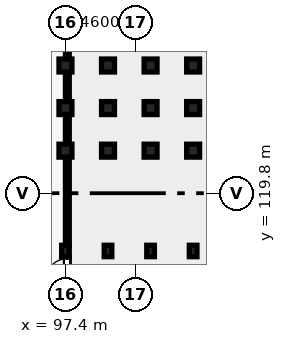
"""IFC4 building model, lengths in metres.
Left out: names, types, materials, properties, quantities, classifications, styles, units other than length and angle.
Written with IfcOpenShell. Run it as: python <this file> out.ifc"""

import sys

from ifc_helpers import new_model, si_unit, direction, frame, frame_2d, origin, origin_2d, place, context, subcontext, project, spatial, rectangle, extrude, element, fill, save


model = new_model("IFC4")
c1 = context("Model", 3, precision=1e-05, world=origin(), true_north=direction((0.0, 1.0)))
c2 = subcontext(c1, "Body", "Model", "MODEL_VIEW")
j1 = project(units=[si_unit("LENGTHUNIT", "METRE"), si_unit("PLANEANGLEUNIT", "RADIAN")], contexts=[c1])
p1 = place(None, origin())
s1 = spatial("IfcSite", under=j1, at=p1, CompositionType="ELEMENT")
p2 = place(p1, origin())
s2 = spatial("IfcBuilding", under=s1, at=p2, CompositionType="ELEMENT")
p3 = place(p2, origin())
s3 = spatial("IfcBuildingStorey", under=s2, at=p3, CompositionType="ELEMENT", Elevation=0.0)
p4 = place(p3, frame((105.8, 116.0, 0.0), z_axis=(0.0, 0.0, 1.0), x_axis=(1.0, 0.0, 0.0)))
e1 = element("IfcColumn", 1, at=p4, inside=s3, PredefinedType="COLUMN", context=c2, shape_type="SweptSolid", body=[
    extrude(rectangle(XDim=0.5, YDim=0.75, at=origin_2d()), origin(), (0.0, 0.0, 1.0), 4.15),
])
for number, where, z_axis, x_axis in (
    (2, (105.8, 122.6, 0.0), (0.0, 0.0, 1.0), (1.0, 0.0, 0.0)),
    (3, (105.8, 125.4, 0.0), (0.0, 0.0, 1.0), (1.0, 0.0, 0.0)),
    (4, (105.8, 128.2, 0.0), (0.0, 0.0, 1.0), (1.0, 0.0, 0.0)),
):
    element("IfcColumn", number, at=place(p3, frame(where, z_axis=z_axis, x_axis=x_axis)), inside=s3, PredefinedType="COLUMN", context=c2, shape_type="SweptSolid", body=[
        extrude(rectangle(XDim=0.85, YDim=0.85, at=origin_2d()), origin(), (0.0, 0.0, 1.0), 4.15),
    ])
p5 = place(p3, frame((103.0, 116.0, 0.0), z_axis=(0.0, 0.0, 1.0), x_axis=(1.0, 0.0, 0.0)))
e5 = element("IfcColumn", 5, at=p5, inside=s3, PredefinedType="COLUMN", context=c2, shape_type="SweptSolid", body=[
    extrude(rectangle(XDim=0.5, YDim=0.75, at=origin_2d()), origin(), (0.0, 0.0, 1.0), 4.15),
])
for number, where, z_axis, x_axis in (
    (6, (103.0, 122.6, 0.0), (0.0, 0.0, 1.0), (1.0, 0.0, 0.0)),
    (7, (103.0, 125.4, 0.0), (0.0, 0.0, 1.0), (1.0, 0.0, 0.0)),
    (8, (103.0, 128.2, 0.0), (0.0, 0.0, 1.0), (1.0, 0.0, 0.0)),
):
    element("IfcColumn", number, at=place(p3, frame(where, z_axis=z_axis, x_axis=x_axis)), inside=s3, PredefinedType="COLUMN", context=c2, shape_type="SweptSolid", body=[
        extrude(rectangle(XDim=0.85, YDim=0.85, at=origin_2d()), origin(), (0.0, 0.0, 1.0), 4.15),
    ])
p6 = place(p3, frame((100.2, 116.0, 0.0), z_axis=(0.0, 0.0, 1.0), x_axis=(1.0, 0.0, 0.0)))
e9 = element("IfcColumn", 9, at=p6, inside=s3, PredefinedType="COLUMN", context=c2, shape_type="SweptSolid", body=[
    extrude(rectangle(XDim=0.5, YDim=0.75, at=origin_2d()), origin(), (0.0, 0.0, 1.0), 4.15),
])
for number, where, z_axis, x_axis in (
    (10, (100.2, 122.6, 0.0), (0.0, 0.0, 1.0), (1.0, 0.0, 0.0)),
    (11, (100.2, 125.4, 0.0), (0.0, 0.0, 1.0), (1.0, 0.0, 0.0)),
    (12, (100.2, 128.2, 0.0), (0.0, 0.0, 1.0), (1.0, 0.0, 0.0)),
):
    element("IfcColumn", number, at=place(p3, frame(where, z_axis=z_axis, x_axis=x_axis)), inside=s3, PredefinedType="COLUMN", context=c2, shape_type="SweptSolid", body=[
        extrude(rectangle(XDim=0.85, YDim=0.85, at=origin_2d()), origin(), (0.0, 0.0, 1.0), 4.15),
    ])
p7 = place(p3, frame((97.4, 116.0, 0.0), z_axis=(0.0, 0.0, 1.0), x_axis=(1.0, 0.0, 0.0)))
e13 = element("IfcColumn", 13, at=p7, inside=s3, PredefinedType="COLUMN", context=c2, shape_type="SweptSolid", body=[
    extrude(rectangle(XDim=0.5, YDim=0.75, at=origin_2d()), origin(), (0.0, 0.0, 1.0), 4.15),
])
for number, where, z_axis, x_axis in (
    (14, (97.4, 122.6, 0.0), (0.0, 0.0, 1.0), (1.0, 0.0, 0.0)),
    (15, (97.4, 125.4, 0.0), (0.0, 0.0, 1.0), (1.0, 0.0, 0.0)),
    (16, (97.4, 128.2, 0.0), (0.0, 0.0, 1.0), (1.0, 0.0, 0.0)),
):
    element("IfcColumn", number, at=place(p3, frame(where, z_axis=z_axis, x_axis=x_axis)), inside=s3, PredefinedType="COLUMN", context=c2, shape_type="SweptSolid", body=[
        extrude(rectangle(XDim=0.85, YDim=0.85, at=origin_2d()), origin(), (0.0, 0.0, 1.0), 4.15),
    ])
p8 = place(p3, frame((108.6, 116.0, 0.0), z_axis=(0.0, 0.0, 1.0), x_axis=(-1.0, 0.0, 0.0)))
e17 = element("IfcWall", 17, at=p8, inside=s3, PredefinedType="STANDARD", context=c2, shape_type="SweptSolid", body=[
    extrude(rectangle(XDim=2.8, YDim=0.2, at=frame_2d((1.4, 0.0))), origin(), (0.0, 0.0, 1.0), 3.492),
])
p9 = place(p8, frame((0.9, 0.0, 0.0)))
e18 = element("IfcOpeningElement", 18, at=p9, cuts=e17, PredefinedType="OPENING", context=c2, shape_type="SweptSolid", body=[
    extrude(rectangle(XDim=1.0, YDim=2.15, at=frame_2d((0.5, 1.075))), frame((0.0, 0.11, 0.0), z_axis=(0.0, -1.0, 0.0), x_axis=(1.0, 0.0, 0.0)), (0.0, 0.0, 1.0), 0.22),
])
p10 = place(p3, frame((108.52, 128.2, 0.0), z_axis=(0.0, 0.0, 1.0), x_axis=(-1.0, 0.0, 0.0)))
e19 = element("IfcWall", 19, at=p10, inside=s3, PredefinedType="PLUMBINGWALL", context=c2, shape_type="SweptSolid", body=[
    extrude(rectangle(XDim=2.64, YDim=0.16, at=frame_2d((1.32, 0.0))), origin(), (0.0, 0.0, 1.0), 3.492),
])
p11 = place(p10, frame((0.87, 0.0, 0.0)))
e20 = element("IfcOpeningElement", 20, at=p11, cuts=e19, PredefinedType="OPENING", context=c2, shape_type="SweptSolid", body=[
    extrude(rectangle(XDim=0.9, YDim=2.1, at=frame_2d((0.45, 1.05))), frame((0.0, 0.09, 0.0), z_axis=(0.0, -1.0, 0.0), x_axis=(1.0, 0.0, 0.0)), (0.0, 0.0, 1.0), 0.18),
])
p12 = place(p3, frame((105.8, 116.0, 0.0), z_axis=(0.0, 0.0, 1.0), x_axis=(-1.0, 0.0, 0.0)))
e21 = element("IfcWall", 21, at=p12, inside=s3, PredefinedType="STANDARD", context=c2, shape_type="SweptSolid", body=[
    extrude(rectangle(XDim=2.8, YDim=0.2, at=frame_2d((1.4, 0.0))), origin(), (0.0, 0.0, 1.0), 3.492),
])
p13 = place(p3, frame((105.72, 128.2, 0.0), z_axis=(0.0, 0.0, 1.0), x_axis=(-1.0, 0.0, 0.0)))
e22 = element("IfcWall", 22, at=p13, inside=s3, PredefinedType="PLUMBINGWALL", context=c2, shape_type="SweptSolid", body=[
    extrude(rectangle(XDim=2.64, YDim=0.16, at=frame_2d((1.32, 0.0))), origin(), (0.0, 0.0, 1.0), 3.492),
])
p14 = place(p13, frame((0.92, 0.0, 0.0)))
e23 = element("IfcOpeningElement", 23, at=p14, cuts=e22, PredefinedType="OPENING", context=c2, shape_type="SweptSolid", body=[
    extrude(rectangle(XDim=0.8, YDim=2.1, at=frame_2d((0.4, 1.05))), frame((0.0, 0.09, 0.0), z_axis=(0.0, -1.0, 0.0), x_axis=(1.0, 0.0, 0.0)), (0.0, 0.0, 1.0), 0.18),
])
p15 = place(p3, frame((103.0, 116.0, 0.0), z_axis=(0.0, 0.0, 1.0), x_axis=(-1.0, 0.0, 0.0)))
e24 = element("IfcWall", 24, at=p15, inside=s3, PredefinedType="STANDARD", context=c2, shape_type="SweptSolid", body=[
    extrude(rectangle(XDim=2.8, YDim=0.2, at=frame_2d((1.4, 0.0))), origin(), (0.0, 0.0, 1.0), 3.492),
])
p16 = place(p15, frame((0.9, 0.0, 0.0)))
e25 = element("IfcOpeningElement", 25, at=p16, cuts=e24, PredefinedType="OPENING", context=c2, shape_type="SweptSolid", body=[
    extrude(rectangle(XDim=1.0, YDim=2.15, at=frame_2d((0.5, 1.075))), frame((0.0, 0.11, 0.0), z_axis=(0.0, -1.0, 0.0), x_axis=(1.0, 0.0, 0.0)), (0.0, 0.0, 1.0), 0.22),
])
p17 = place(p3, frame((102.92, 128.2, 0.0), z_axis=(0.0, 0.0, 1.0), x_axis=(-1.0, 0.0, 0.0)))
e26 = element("IfcWall", 26, at=p17, inside=s3, PredefinedType="PLUMBINGWALL", context=c2, shape_type="SweptSolid", body=[
    extrude(rectangle(XDim=2.64, YDim=0.16, at=frame_2d((1.32, 0.0))), origin(), (0.0, 0.0, 1.0), 3.492),
])
p18 = place(p17, frame((0.87, 0.0, 0.0)))
e27 = element("IfcOpeningElement", 27, at=p18, cuts=e26, PredefinedType="OPENING", context=c2, shape_type="SweptSolid", body=[
    extrude(rectangle(XDim=0.9, YDim=2.1, at=frame_2d((0.45, 1.05))), frame((0.0, 0.09, 0.0), z_axis=(0.0, -1.0, 0.0), x_axis=(1.0, 0.0, 0.0)), (0.0, 0.0, 1.0), 0.18),
])
p19 = place(p3, frame((100.2, 116.0, 0.0), z_axis=(0.0, 0.0, 1.0), x_axis=(-1.0, 0.0, 0.0)))
e28 = element("IfcWall", 28, at=p19, inside=s3, PredefinedType="STANDARD", context=c2, shape_type="SweptSolid", body=[
    extrude(rectangle(XDim=2.8, YDim=0.2, at=frame_2d((1.4, 0.0))), origin(), (0.0, 0.0, 1.0), 3.492),
])
p20 = place(p3, frame((100.12, 128.2, 0.0), z_axis=(0.0, 0.0, 1.0), x_axis=(-1.0, 0.0, 0.0)))
e29 = element("IfcWall", 29, at=p20, inside=s3, PredefinedType="PLUMBINGWALL", context=c2, shape_type="SweptSolid", body=[
    extrude(rectangle(XDim=2.64, YDim=0.16, at=frame_2d((1.32, 0.0))), origin(), (0.0, 0.0, 1.0), 3.492),
])
p21 = place(p20, frame((0.92, 0.0, 0.0)))
e30 = element("IfcOpeningElement", 30, at=p21, cuts=e29, PredefinedType="OPENING", context=c2, shape_type="SweptSolid", body=[
    extrude(rectangle(XDim=0.8, YDim=2.1, at=frame_2d((0.4, 1.05))), frame((0.0, 0.09, 0.0), z_axis=(0.0, -1.0, 0.0), x_axis=(1.0, 0.0, 0.0)), (0.0, 0.0, 1.0), 0.18),
])
p22 = place(p3, frame((105.8, 116.05, 0.0), z_axis=(0.0, 0.0, 1.0), x_axis=(0.0, 1.0, 0.0)))
e31 = element("IfcWall", 31, at=p22, inside=s3, PredefinedType="PARTITIONING", context=c2, shape_type="SweptSolid", body=[
    extrude(rectangle(XDim=6.53, YDim=0.15, at=frame_2d((3.265, 0.0))), origin(), (0.0, 0.0, 1.0), 3.492),
])
p23 = place(p22, frame((2.815, 0.0, 0.0)))
e32 = element("IfcOpeningElement", 32, at=p23, cuts=e31, PredefinedType="OPENING", context=c2, shape_type="SweptSolid", body=[
    extrude(rectangle(XDim=0.9, YDim=2.1, at=frame_2d((0.45, 1.05))), frame((0.0, 0.085, 0.0), z_axis=(0.0, -1.0, 0.0), x_axis=(1.0, 0.0, 0.0)), (0.0, 0.0, 1.0), 0.17),
])
p24 = place(p3, frame((105.8, 122.7, 0.0), z_axis=(0.0, 0.0, 1.0), x_axis=(0.0, 1.0, 0.0)))
e33 = element("IfcWall", 33, at=p24, inside=s3, PredefinedType="PARTITIONING", context=c2, shape_type="SweptSolid", body=[
    extrude(rectangle(XDim=10.82, YDim=0.15, at=frame_2d((5.41, 0.0))), origin(), (0.0, 0.0, 1.0), 3.492),
])
p25 = place(p24, frame((0.899, 0.0, 0.0)))
e34 = element("IfcOpeningElement", 34, at=p25, cuts=e33, PredefinedType="OPENING", context=c2, shape_type="SweptSolid", body=[
    extrude(rectangle(XDim=0.8, YDim=2.1, at=frame_2d((0.4, 1.05))), frame((0.0, 0.085, 0.0), z_axis=(0.0, -1.0, 0.0), x_axis=(1.0, 0.0, 0.0)), (0.0, 0.0, 1.0), 0.17),
])
p26 = place(p3, frame((103.0, 116.05, 0.0), z_axis=(0.0, 0.0, 1.0), x_axis=(0.0, 1.0, 0.0)))
e35 = element("IfcWall", 35, at=p26, inside=s3, PredefinedType="STANDARD", context=c2, shape_type="SweptSolid", body=[
    extrude(rectangle(XDim=6.53, YDim=0.22, at=frame_2d((3.265, 0.0))), origin(), (0.0, 0.0, 1.0), 3.492),
])
p27 = place(p3, frame((103.0, 122.7, 0.0), z_axis=(0.0, 0.0, 1.0), x_axis=(0.0, 1.0, 0.0)))
e36 = element("IfcWall", 36, at=p27, inside=s3, PredefinedType="STANDARD", context=c2, shape_type="SweptSolid", body=[
    extrude(rectangle(XDim=10.82, YDim=0.22, at=frame_2d((5.41, 0.0))), origin(), (0.0, 0.0, 1.0), 3.492),
])
p28 = place(p3, frame((100.2, 116.05, 0.0), z_axis=(0.0, 0.0, 1.0), x_axis=(0.0, 1.0, 0.0)))
e37 = element("IfcWall", 37, at=p28, inside=s3, PredefinedType="PARTITIONING", context=c2, shape_type="SweptSolid", body=[
    extrude(rectangle(XDim=6.53, YDim=0.15, at=frame_2d((3.265, 0.0))), origin(), (0.0, 0.0, 1.0), 3.492),
])
p29 = place(p28, frame((2.815, 0.0, 0.0)))
e38 = element("IfcOpeningElement", 38, at=p29, cuts=e37, PredefinedType="OPENING", context=c2, shape_type="SweptSolid", body=[
    extrude(rectangle(XDim=0.9, YDim=2.1, at=frame_2d((0.45, 1.05))), frame((0.0, 0.085, 0.0), z_axis=(0.0, -1.0, 0.0), x_axis=(1.0, 0.0, 0.0)), (0.0, 0.0, 1.0), 0.17),
])
p30 = place(p3, frame((100.2, 122.7, 0.0), z_axis=(0.0, 0.0, 1.0), x_axis=(0.0, 1.0, 0.0)))
e39 = element("IfcWall", 39, at=p30, inside=s3, PredefinedType="PARTITIONING", context=c2, shape_type="SweptSolid", body=[
    extrude(rectangle(XDim=10.82, YDim=0.15, at=frame_2d((5.41, 0.0))), origin(), (0.0, 0.0, 1.0), 3.492),
])
p31 = place(p30, frame((0.899, 0.0, 0.0)))
e40 = element("IfcOpeningElement", 40, at=p31, cuts=e39, PredefinedType="OPENING", context=c2, shape_type="SweptSolid", body=[
    extrude(rectangle(XDim=0.8, YDim=2.1, at=frame_2d((0.4, 1.05))), frame((0.0, 0.085, 0.0), z_axis=(0.0, -1.0, 0.0), x_axis=(1.0, 0.0, 0.0)), (0.0, 0.0, 1.0), 0.17),
])
p32 = place(p3, frame((97.525, 113.979, 0.0), z_axis=(0.0, 0.0, 1.0), x_axis=(0.0, 1.0, 0.0)))
e41 = element("IfcWall", 41, at=p32, inside=s3, PredefinedType="STANDARD", context=c2, shape_type="SweptSolid", body=[
    extrude(rectangle(XDim=1.643, YDim=0.25, at=frame_2d((0.822, 0.0))), origin(), (0.0, 0.0, 1.0), 3.492),
])
p33 = place(p32, frame((0.123, 0.0, 0.0)))
e42 = element("IfcOpeningElement", 42, at=p33, cuts=e41, PredefinedType="OPENING", context=c2, shape_type="SweptSolid", body=[
    extrude(rectangle(XDim=1.4, YDim=2.15, at=frame_2d((0.7, 1.075))), frame((0.0, 0.135, 0.0), z_axis=(0.0, -1.0, 0.0), x_axis=(1.0, 0.0, 0.0)), (0.0, 0.0, 1.0), 0.27),
])
p34 = place(p3, frame((97.525, 116.378, 0.0), z_axis=(0.0, 0.0, 1.0), x_axis=(0.0, 1.0, 0.0)))
e43 = element("IfcWall", 43, at=p34, inside=s3, PredefinedType="STANDARD", context=c2, shape_type="SweptSolid", body=[
    extrude(rectangle(XDim=5.802, YDim=0.25, at=frame_2d((2.901, 0.0))), origin(), (0.0, 0.0, 1.0), 3.492),
])
p35 = place(p34, frame((2.171, 0.0, 0.88)))
e44 = element("IfcOpeningElement", 44, at=p35, cuts=e43, PredefinedType="OPENING", context=c2, shape_type="SweptSolid", body=[
    extrude(rectangle(XDim=1.5, YDim=1.65, at=frame_2d((0.75, 0.825))), frame((0.0, 0.135, 0.0), z_axis=(0.0, -1.0, 0.0), x_axis=(1.0, 0.0, 0.0)), (0.0, 0.0, 1.0), 0.27),
])
p36 = place(p3, frame((97.525, 123.02, 0.0), z_axis=(0.0, 0.0, 1.0), x_axis=(0.0, 1.0, 0.0)))
e45 = element("IfcWall", 45, at=p36, inside=s3, PredefinedType="STANDARD", context=c2, shape_type="SweptSolid", body=[
    extrude(rectangle(XDim=1.96, YDim=0.25, at=frame_2d((0.98, 0.0))), origin(), (0.0, 0.0, 1.0), 3.492),
])
p37 = place(p36, frame((0.38, 0.0, 0.88)))
e46 = element("IfcOpeningElement", 46, at=p37, cuts=e45, PredefinedType="OPENING", context=c2, shape_type="SweptSolid", body=[
    extrude(rectangle(XDim=1.2, YDim=1.5, at=frame_2d((0.6, 0.75))), frame((0.0, 0.135, 0.0), z_axis=(0.0, -1.0, 0.0), x_axis=(1.0, 0.0, 0.0)), (0.0, 0.0, 1.0), 0.27),
])
p38 = place(p3, frame((97.525, 125.82, 0.0), z_axis=(0.0, 0.0, 1.0), x_axis=(0.0, 1.0, 0.0)))
e47 = element("IfcWall", 47, at=p38, inside=s3, PredefinedType="STANDARD", context=c2, shape_type="SweptSolid", body=[
    extrude(rectangle(XDim=1.96, YDim=0.25, at=frame_2d((0.98, 0.0))), origin(), (0.0, 0.0, 1.0), 3.492),
])
p39 = place(p38, frame((0.38, 0.0, 0.88)))
e48 = element("IfcOpeningElement", 48, at=p39, cuts=e47, PredefinedType="OPENING", context=c2, shape_type="SweptSolid", body=[
    extrude(rectangle(XDim=1.2, YDim=1.5, at=frame_2d((0.6, 0.75))), frame((0.0, 0.135, 0.0), z_axis=(0.0, -1.0, 0.0), x_axis=(1.0, 0.0, 0.0)), (0.0, 0.0, 1.0), 0.27),
])
p40 = place(p3, frame((97.525, 128.62, 0.0), z_axis=(0.0, 0.0, 1.0), x_axis=(0.0, 1.0, 0.0)))
e49 = element("IfcWall", 49, at=p40, inside=s3, PredefinedType="STANDARD", context=c2, shape_type="SweptSolid", body=[
    extrude(rectangle(XDim=1.96, YDim=0.25, at=frame_2d((0.98, 0.0))), origin(), (0.0, 0.0, 1.0), 3.492),
])
p41 = place(p40, frame((0.38, 0.0, 0.88)))
e50 = element("IfcOpeningElement", 50, at=p41, cuts=e49, PredefinedType="OPENING", context=c2, shape_type="SweptSolid", body=[
    extrude(rectangle(XDim=1.2, YDim=1.5, at=frame_2d((0.6, 0.75))), frame((0.0, 0.135, 0.0), z_axis=(0.0, -1.0, 0.0), x_axis=(1.0, 0.0, 0.0)), (0.0, 0.0, 1.0), 0.27),
])
p42 = place(p35, origin())
e51 = element("IfcWindow", 51, at=p42, inside=s3, PartitioningType="DOUBLE_PANEL_VERTICAL", PredefinedType="WINDOW", context=c2, shape_type="SweptSolid", body=[
    extrude(rectangle(XDim=1.5, YDim=1.65, at=frame_2d((0.75, 0.825))), frame((0.0, 0.03, 0.0), z_axis=(0.0, -1.0, 0.0), x_axis=(1.0, 0.0, 0.0)), (0.0, 0.0, 1.0), 0.06),
])
fill(e44, e51)
p43 = place(p37, origin())
e52 = element("IfcWindow", 52, at=p43, inside=s3, PartitioningType="SINGLE_PANEL", PredefinedType="WINDOW", context=c2, shape_type="SweptSolid", body=[
    extrude(rectangle(XDim=1.2, YDim=1.5, at=frame_2d((0.6, 0.75))), frame((0.0, 0.03, 0.0), z_axis=(0.0, -1.0, 0.0), x_axis=(1.0, 0.0, 0.0)), (0.0, 0.0, 1.0), 0.06),
])
fill(e46, e52)
p44 = place(p39, origin())
e53 = element("IfcWindow", 53, at=p44, inside=s3, PartitioningType="SINGLE_PANEL", PredefinedType="WINDOW", context=c2, shape_type="SweptSolid", body=[
    extrude(rectangle(XDim=1.2, YDim=1.5, at=frame_2d((0.6, 0.75))), frame((0.0, 0.03, 0.0), z_axis=(0.0, -1.0, 0.0), x_axis=(1.0, 0.0, 0.0)), (0.0, 0.0, 1.0), 0.06),
])
fill(e48, e53)
p45 = place(p41, origin())
e54 = element("IfcWindow", 54, at=p45, inside=s3, PartitioningType="SINGLE_PANEL", PredefinedType="WINDOW", context=c2, shape_type="SweptSolid", body=[
    extrude(rectangle(XDim=1.2, YDim=1.5, at=frame_2d((0.6, 0.75))), frame((0.0, 0.03, 0.0), z_axis=(0.0, -1.0, 0.0), x_axis=(1.0, 0.0, 0.0)), (0.0, 0.0, 1.0), 0.06),
])
fill(e50, e54)
p46 = place(p14, origin())
e55 = element("IfcDoor", 55, at=p46, inside=s3, OperationType="SINGLE_SWING_LEFT", PredefinedType="DOOR", context=c2, shape_type="SweptSolid", body=[
    extrude(rectangle(XDim=0.8, YDim=2.1, at=frame_2d((0.4, 1.05))), frame((0.0, 0.025, 0.0), z_axis=(0.0, -1.0, 0.0), x_axis=(1.0, 0.0, 0.0)), (0.0, 0.0, 1.0), 0.05),
])
fill(e23, e55)
p47 = place(p18, origin())
e56 = element("IfcDoor", 56, at=p47, inside=s3, OperationType="SINGLE_SWING_LEFT", PredefinedType="DOOR", context=c2, shape_type="SweptSolid", body=[
    extrude(rectangle(XDim=0.9, YDim=2.1, at=frame_2d((0.45, 1.05))), frame((0.0, 0.025, 0.0), z_axis=(0.0, -1.0, 0.0), x_axis=(1.0, 0.0, 0.0)), (0.0, 0.0, 1.0), 0.05),
])
fill(e27, e56)
p48 = place(p16, frame((1.0, 0.0, 0.0), z_axis=(0.0, 0.0, 1.0), x_axis=(-1.0, 0.0, 0.0)))
e57 = element("IfcDoor", 57, at=p48, inside=s3, OperationType="SINGLE_SWING_RIGHT", PredefinedType="DOOR", context=c2, shape_type="SweptSolid", body=[
    extrude(rectangle(XDim=1.0, YDim=2.15, at=frame_2d((0.5, 1.075))), frame((0.0, 0.025, 0.0), z_axis=(0.0, -1.0, 0.0), x_axis=(1.0, 0.0, 0.0)), (0.0, 0.0, 1.0), 0.05),
])
fill(e25, e57)
p49 = place(p21, origin())
e58 = element("IfcDoor", 58, at=p49, inside=s3, OperationType="SINGLE_SWING_LEFT", PredefinedType="DOOR", context=c2, shape_type="SweptSolid", body=[
    extrude(rectangle(XDim=0.8, YDim=2.1, at=frame_2d((0.4, 1.05))), frame((0.0, 0.025, 0.0), z_axis=(0.0, -1.0, 0.0), x_axis=(1.0, 0.0, 0.0)), (0.0, 0.0, 1.0), 0.05),
])
fill(e30, e58)
p50 = place(p23, frame((0.9, 0.0, 0.0), z_axis=(0.0, 0.0, 1.0), x_axis=(-1.0, 0.0, 0.0)))
e59 = element("IfcDoor", 59, at=p50, inside=s3, OperationType="SINGLE_SWING_RIGHT", PredefinedType="DOOR", context=c2, shape_type="SweptSolid", body=[
    extrude(rectangle(XDim=0.9, YDim=2.1, at=frame_2d((0.45, 1.05))), frame((0.0, 0.025, 0.0), z_axis=(0.0, -1.0, 0.0), x_axis=(1.0, 0.0, 0.0)), (0.0, 0.0, 1.0), 0.05),
])
fill(e32, e59)
p51 = place(p25, origin())
e60 = element("IfcDoor", 60, at=p51, inside=s3, OperationType="SINGLE_SWING_LEFT", PredefinedType="DOOR", context=c2, shape_type="SweptSolid", body=[
    extrude(rectangle(XDim=0.8, YDim=2.1, at=frame_2d((0.4, 1.05))), frame((0.0, 0.025, 0.0), z_axis=(0.0, -1.0, 0.0), x_axis=(1.0, 0.0, 0.0)), (0.0, 0.0, 1.0), 0.05),
])
fill(e34, e60)
p52 = place(p29, origin())
e61 = element("IfcDoor", 61, at=p52, inside=s3, OperationType="SINGLE_SWING_LEFT", PredefinedType="DOOR", context=c2, shape_type="SweptSolid", body=[
    extrude(rectangle(XDim=0.9, YDim=2.1, at=frame_2d((0.45, 1.05))), frame((0.0, 0.025, 0.0), z_axis=(0.0, -1.0, 0.0), x_axis=(1.0, 0.0, 0.0)), (0.0, 0.0, 1.0), 0.05),
])
fill(e38, e61)
p53 = place(p31, frame((0.8, 0.0, 0.0), z_axis=(0.0, 0.0, 1.0), x_axis=(-1.0, 0.0, 0.0)))
e62 = element("IfcDoor", 62, at=p53, inside=s3, OperationType="SINGLE_SWING_RIGHT", PredefinedType="DOOR", context=c2, shape_type="SweptSolid", body=[
    extrude(rectangle(XDim=0.8, YDim=2.1, at=frame_2d((0.4, 1.05))), frame((0.0, 0.025, 0.0), z_axis=(0.0, -1.0, 0.0), x_axis=(1.0, 0.0, 0.0)), (0.0, 0.0, 1.0), 0.05),
])
fill(e40, e62)
p54 = place(p33, origin())
e63 = element("IfcDoor", 63, at=p54, inside=s3, OperationType="SINGLE_SWING_LEFT", PredefinedType="DOOR", context=c2, shape_type="SweptSolid", body=[
    extrude(rectangle(XDim=1.4, YDim=2.15, at=frame_2d((0.7, 1.075))), frame((0.0, 0.025, 0.0), z_axis=(0.0, -1.0, 0.0), x_axis=(1.0, 0.0, 0.0)), (0.0, 0.0, 1.0), 0.05),
])
fill(e42, e63)
save(model, sys.argv[1])
